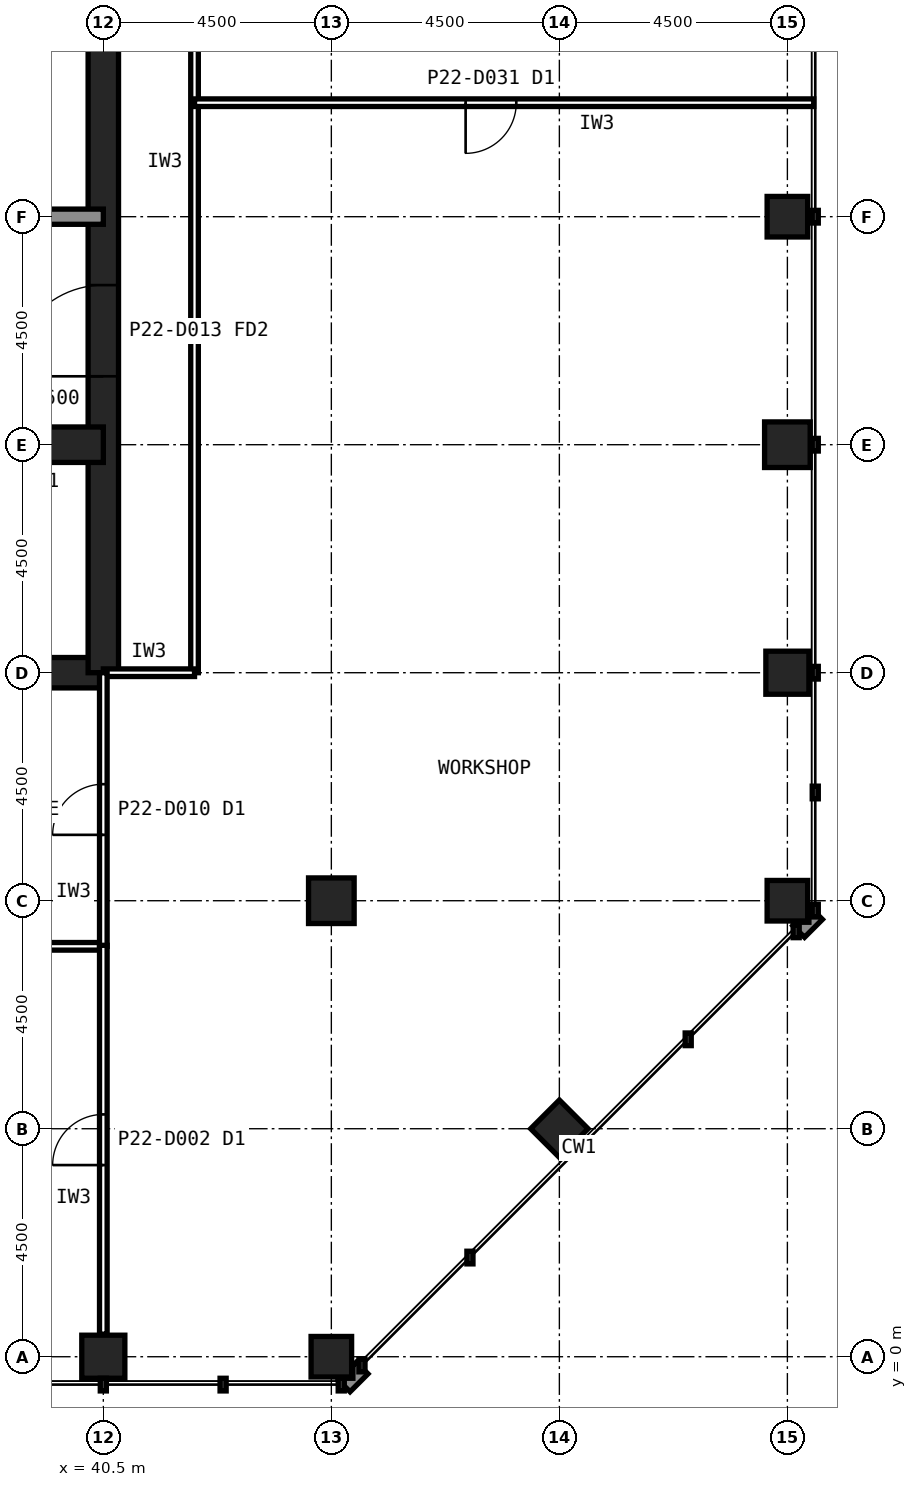
"""IFC4 building model, lengths in metres.
Left out: names, types, materials, properties, quantities, classifications, styles, units other than length and angle.
Written with IfcOpenShell. Run it as: python <this file> out.ifc"""

import sys

from ifc_helpers import new_model, si_unit, direction, frame, frame_2d, origin, origin_2d, place, context, subcontext, project, spatial, rectangle, hollow_rectangle, extrude, element, fill, save


model = new_model("IFC4")
c1 = context("Model", 3, precision=1e-05, world=origin(), true_north=direction((0.0, 1.0)))
c2 = subcontext(c1, "Body", "Model", "MODEL_VIEW")
j1 = project(units=[si_unit("LENGTHUNIT", "METRE"), si_unit("PLANEANGLEUNIT", "RADIAN")], contexts=[c1])
p1 = place(None, origin())
s1 = spatial("IfcSite", under=j1, at=p1, CompositionType="ELEMENT")
p2 = place(p1, origin())
s2 = spatial("IfcBuilding", under=s1, at=p2, CompositionType="ELEMENT")
p3 = place(p2, frame((0.0, 0.0, 96.2)))
s3 = spatial("IfcBuildingStorey", under=s2, at=p3, CompositionType="ELEMENT", Elevation=96.2)
p4 = place(p3, frame((40.5, 0.0, 0.0), z_axis=(0.0, 0.0, 1.0), x_axis=(1.0, 0.0, 0.0)))
e1 = element("IfcColumn", 1, at=p4, inside=s3, PredefinedType="COLUMN", context=c2, shape_type="SweptSolid", body=[
    extrude(hollow_rectangle(XDim=0.85, YDim=0.85, WallThickness=0.05, at=origin_2d()), origin(), (0.0, 0.0, 1.0), 4.2),
])
for number, where, z_axis, x_axis in (
    (2, (45.0, 0.0, 0.0), (0.0, 0.0, 1.0), (1.0, 0.0, 0.0)),
    (3, (54.0, 9.0, 0.0), (0.0, 0.0, 1.0), (1.0, 0.0, 0.0)),
):
    element("IfcColumn", number, at=place(p3, frame(where, z_axis=z_axis, x_axis=x_axis)), inside=s3, PredefinedType="COLUMN", context=c2, shape_type="SweptSolid", body=[
        extrude(hollow_rectangle(XDim=0.8, YDim=0.8, WallThickness=0.045, at=origin_2d()), origin(), (0.0, 0.0, 1.0), 4.2),
    ])
p5 = place(p3, frame((54.0, 13.5, 0.0), z_axis=(0.0, 0.0, 1.0), x_axis=(1.0, 0.0, 0.0)))
e4 = element("IfcColumn", 4, at=p5, inside=s3, PredefinedType="COLUMN", context=c2, shape_type="SweptSolid", body=[
    extrude(hollow_rectangle(XDim=0.85, YDim=0.85, WallThickness=0.05, at=origin_2d()), origin(), (0.0, 0.0, 1.0), 4.2),
])
p6 = place(p3, frame((54.0, 18.0, 0.0), z_axis=(0.0, 0.0, 1.0), x_axis=(1.0, 0.0, 0.0)))
e5 = element("IfcColumn", 5, at=p6, inside=s3, PredefinedType="COLUMN", context=c2, shape_type="SweptSolid", body=[
    extrude(hollow_rectangle(XDim=0.9, YDim=0.9, WallThickness=0.063, at=origin_2d()), origin(), (0.0, 0.0, 1.0), 4.2),
])
for number, where, z_axis, x_axis in (
    (6, (54.0, 22.5, 0.0), (0.0, 0.0, 1.0), (1.0, 0.0, 0.0)),
    (7, (49.5, 4.5, 0.0), (0.0, 0.0, 1.0), (0.707, 0.707, 0.0)),
):
    element("IfcColumn", number, at=place(p3, frame(where, z_axis=z_axis, x_axis=x_axis)), inside=s3, PredefinedType="COLUMN", context=c2, shape_type="SweptSolid", body=[
        extrude(hollow_rectangle(XDim=0.8, YDim=0.8, WallThickness=0.045, at=origin_2d()), origin(), (0.0, 0.0, 1.0), 4.2),
    ])
p7 = place(p3, frame((45.0, 9.0, 0.0), z_axis=(0.0, 0.0, 1.0), x_axis=(1.0, 0.0, 0.0)))
e8 = element("IfcColumn", 8, at=p7, inside=s3, PredefinedType="COLUMN", context=c2, shape_type="SweptSolid", body=[
    extrude(hollow_rectangle(XDim=0.9, YDim=0.9, WallThickness=0.063, at=origin_2d()), origin(), (0.0, 0.0, 1.0), 4.2),
])
p8 = place(p3, frame((13.5, 13.5, 0.0), z_axis=(0.0, 0.0, 1.0), x_axis=(1.0, 0.0, 0.0)))
e9 = element("IfcWall", 9, at=p8, inside=s3, PredefinedType="SHEAR", context=c2, shape_type="SweptSolid", body=[
    extrude(rectangle(XDim=27.0, YDim=0.6, at=frame_2d((13.5, 0.0))), origin(), (0.0, 0.0, 1.0), 4.2),
])
p9 = place(p3, frame((40.5, 13.5, 0.0), z_axis=(0.0, 0.0, 1.0), x_axis=(0.0, 1.0, 0.0)))
e10 = element("IfcWall", 10, at=p9, inside=s3, PredefinedType="SHEAR", context=c2, shape_type="SweptSolid", body=[
    extrude(rectangle(XDim=27.0, YDim=0.6, at=frame_2d((13.5, 0.0))), origin(), (0.0, 0.0, 1.0), 4.2),
])
p10 = place(p9, frame((5.85, 0.0, 0.0)))
e11 = element("IfcOpeningElement", 11, at=p10, cuts=e10, PredefinedType="OPENING", context=c2, shape_type="SweptSolid", body=[
    extrude(rectangle(XDim=1.8, YDim=2.1, at=frame_2d((0.9, 1.05))), frame((0.0, 0.31, 0.0), z_axis=(0.0, -1.0, 0.0), x_axis=(1.0, 0.0, 0.0)), (0.0, 0.0, 1.0), 0.62),
])
p11 = place(p9, frame((19.65, 0.0, 0.0)))
e12 = element("IfcOpeningElement", 12, at=p11, cuts=e10, PredefinedType="OPENING", context=c2, shape_type="SweptSolid", body=[
    extrude(rectangle(XDim=1.2, YDim=2.1, at=frame_2d((0.6, 1.05))), frame((0.0, 0.31, 0.0), z_axis=(0.0, -1.0, 0.0), x_axis=(1.0, 0.0, 0.0)), (0.0, 0.0, 1.0), 0.62),
])
p12 = place(p3, frame((13.5, 18.0, 0.0), z_axis=(0.0, 0.0, 1.0), x_axis=(1.0, 0.0, 0.0)))
e13 = element("IfcWall", 13, at=p12, inside=s3, PredefinedType="SHEAR", context=c2, shape_type="SweptSolid", body=[
    extrude(rectangle(XDim=27.0, YDim=0.7, at=frame_2d((13.5, 0.0))), origin(), (0.0, 0.0, 1.0), 4.2),
])
p13 = place(p12, frame((24.3, 0.0, 0.0)))
e14 = element("IfcOpeningElement", 14, at=p13, cuts=e13, PredefinedType="OPENING", context=c2, shape_type="SweptSolid", body=[
    extrude(rectangle(XDim=0.9, YDim=2.1, at=frame_2d((0.45, 1.05))), frame((0.0, 0.36, 0.0), z_axis=(0.0, -1.0, 0.0), x_axis=(1.0, 0.0, 0.0)), (0.0, 0.0, 1.0), 0.72),
])
p14 = place(p12, frame((5.45, 0.0, 0.0)))
e15 = element("IfcOpeningElement", 15, at=p14, cuts=e13, PredefinedType="OPENING", context=c2, shape_type="SweptSolid", body=[
    extrude(rectangle(XDim=1.1, YDim=2.1, at=frame_2d((0.55, 1.05))), frame((0.0, 0.36, 0.0), z_axis=(0.0, -1.0, 0.0), x_axis=(1.0, 0.0, 0.0)), (0.0, 0.0, 1.0), 0.72),
])
p15 = place(p12, frame((8.45, 0.0, 0.0)))
e16 = element("IfcOpeningElement", 16, at=p15, cuts=e13, PredefinedType="OPENING", context=c2, shape_type="SweptSolid", body=[
    extrude(rectangle(XDim=1.1, YDim=2.1, at=frame_2d((0.55, 1.05))), frame((0.0, 0.36, 0.0), z_axis=(0.0, -1.0, 0.0), x_axis=(1.0, 0.0, 0.0)), (0.0, 0.0, 1.0), 0.72),
])
p16 = place(p12, frame((11.45, 0.0, 0.0)))
e17 = element("IfcOpeningElement", 17, at=p16, cuts=e13, PredefinedType="OPENING", context=c2, shape_type="SweptSolid", body=[
    extrude(rectangle(XDim=1.1, YDim=2.1, at=frame_2d((0.55, 1.05))), frame((0.0, 0.36, 0.0), z_axis=(0.0, -1.0, 0.0), x_axis=(1.0, 0.0, 0.0)), (0.0, 0.0, 1.0), 0.72),
])
p17 = place(p12, frame((14.45, 0.0, 0.0)))
e18 = element("IfcOpeningElement", 18, at=p17, cuts=e13, PredefinedType="OPENING", context=c2, shape_type="SweptSolid", body=[
    extrude(rectangle(XDim=1.1, YDim=2.1, at=frame_2d((0.55, 1.05))), frame((0.0, 0.36, 0.0), z_axis=(0.0, -1.0, 0.0), x_axis=(1.0, 0.0, 0.0)), (0.0, 0.0, 1.0), 0.72),
])
p18 = place(p12, frame((17.45, 0.0, 0.0)))
e19 = element("IfcOpeningElement", 19, at=p18, cuts=e13, PredefinedType="OPENING", context=c2, shape_type="SweptSolid", body=[
    extrude(rectangle(XDim=1.1, YDim=2.1, at=frame_2d((0.55, 1.05))), frame((0.0, 0.36, 0.0), z_axis=(0.0, -1.0, 0.0), x_axis=(1.0, 0.0, 0.0)), (0.0, 0.0, 1.0), 0.72),
])
p19 = place(p12, frame((20.45, 0.0, 0.0)))
e20 = element("IfcOpeningElement", 20, at=p19, cuts=e13, PredefinedType="OPENING", context=c2, shape_type="SweptSolid", body=[
    extrude(rectangle(XDim=1.1, YDim=2.1, at=frame_2d((0.55, 1.05))), frame((0.0, 0.36, 0.0), z_axis=(0.0, -1.0, 0.0), x_axis=(1.0, 0.0, 0.0)), (0.0, 0.0, 1.0), 0.72),
])
p20 = place(p12, frame((1.6, 0.0, 0.0)))
e21 = element("IfcOpeningElement", 21, at=p20, cuts=e13, PredefinedType="OPENING", context=c2, shape_type="SweptSolid", body=[
    extrude(rectangle(XDim=1.3, YDim=2.2, at=frame_2d((0.65, 1.1))), frame((0.0, 0.36, 0.0), z_axis=(0.0, -1.0, 0.0), x_axis=(1.0, 0.0, 0.0)), (0.0, 0.0, 1.0), 0.72),
])
p21 = place(p3, frame((13.5, 22.5, 0.0), z_axis=(0.0, 0.0, 1.0), x_axis=(1.0, 0.0, 0.0)))
e22 = element("IfcWall", 22, at=p21, inside=s3, PredefinedType="SOLIDWALL", context=c2, shape_type="SweptSolid", body=[
    extrude(rectangle(XDim=27.0, YDim=0.3, at=frame_2d((13.5, 0.0))), origin(), (0.0, 0.0, 1.0), 4.04),
])
p22 = place(p21, frame((1.65, 0.0, 0.0)))
e23 = element("IfcOpeningElement", 23, at=p22, cuts=e22, PredefinedType="OPENING", context=c2, shape_type="SweptSolid", body=[
    extrude(rectangle(XDim=1.2, YDim=2.1, at=frame_2d((0.6, 1.05))), frame((0.0, 0.16, 0.0), z_axis=(0.0, -1.0, 0.0), x_axis=(1.0, 0.0, 0.0)), (0.0, 0.0, 1.0), 0.32),
])
p23 = place(p21, frame((6.025, 0.0, 0.0)))
e24 = element("IfcOpeningElement", 24, at=p23, cuts=e22, PredefinedType="OPENING", context=c2, shape_type="SweptSolid", body=[
    extrude(rectangle(XDim=1.0, YDim=2.1, at=frame_2d((0.5, 1.05))), frame((0.0, 0.16, 0.0), z_axis=(0.0, -1.0, 0.0), x_axis=(1.0, 0.0, 0.0)), (0.0, 0.0, 1.0), 0.32),
])
p24 = place(p21, frame((10.525, 0.0, 0.0)))
e25 = element("IfcOpeningElement", 25, at=p24, cuts=e22, PredefinedType="OPENING", context=c2, shape_type="SweptSolid", body=[
    extrude(rectangle(XDim=1.0, YDim=2.1, at=frame_2d((0.5, 1.05))), frame((0.0, 0.16, 0.0), z_axis=(0.0, -1.0, 0.0), x_axis=(1.0, 0.0, 0.0)), (0.0, 0.0, 1.0), 0.32),
])
p25 = place(p21, frame((19.75, 0.0, 0.0)))
e26 = element("IfcOpeningElement", 26, at=p25, cuts=e22, PredefinedType="OPENING", context=c2, shape_type="SweptSolid", body=[
    extrude(rectangle(XDim=1.0, YDim=2.1, at=frame_2d((0.5, 1.05))), frame((0.0, 0.16, 0.0), z_axis=(0.0, -1.0, 0.0), x_axis=(1.0, 0.0, 0.0)), (0.0, 0.0, 1.0), 0.32),
])
p26 = place(p21, frame((15.05, 0.0, 0.0)))
e27 = element("IfcOpeningElement", 27, at=p26, cuts=e22, PredefinedType="OPENING", context=c2, shape_type="SweptSolid", body=[
    extrude(rectangle(XDim=1.4, YDim=2.4, at=frame_2d((0.7, 1.2))), frame((0.0, 0.16, 0.0), z_axis=(0.0, -1.0, 0.0), x_axis=(1.0, 0.0, 0.0)), (0.0, 0.0, 1.0), 0.32),
])
p27 = place(p3, frame((42.3, 13.5, 0.0), z_axis=(0.0, 0.0, 1.0), x_axis=(0.0, 1.0, 0.0)))
e28 = element("IfcWall", 28, at=p27, inside=s3, PredefinedType="PARTITIONING", context=c2, shape_type="SweptSolid", body=[
    extrude(rectangle(XDim=28.8, YDim=0.15, at=frame_2d((14.4, 0.0))), origin(), (0.0, 0.0, 1.0), 4.04),
])
p28 = place(p27, frame((13.9, 0.0, 0.0)))
e29 = element("IfcOpeningElement", 29, at=p28, cuts=e28, PredefinedType="OPENING", context=c2, shape_type="SweptSolid", body=[
    extrude(rectangle(XDim=1.0, YDim=2.1, at=frame_2d((0.5, 1.05))), frame((0.0, 0.085, 0.0), z_axis=(0.0, -1.0, 0.0), x_axis=(1.0, 0.0, 0.0)), (0.0, 0.0, 1.0), 0.17),
])
p29 = place(p3, frame((40.5, 13.5, 0.0), z_axis=(0.0, 0.0, 1.0), x_axis=(1.0, 0.0, 0.0)))
e30 = element("IfcWall", 30, at=p29, inside=s3, PredefinedType="PARTITIONING", context=c2, shape_type="SweptSolid", body=[
    extrude(rectangle(XDim=1.8, YDim=0.15, at=frame_2d((0.9, 0.0))), origin(), (0.0, 0.0, 1.0), 3.189),
])
p30 = place(p3, frame((36.0, 8.1, 0.0), z_axis=(0.0, 0.0, 1.0), x_axis=(1.0, 0.0, 0.0)))
e31 = element("IfcWall", 31, at=p30, inside=s3, PredefinedType="PARTITIONING", context=c2, shape_type="SweptSolid", body=[
    extrude(rectangle(XDim=4.5, YDim=0.15, at=frame_2d((2.25, 0.0))), origin(), (0.0, 0.0, 1.0), 4.04),
])
p31 = place(p3, frame((40.5, 8.1, 0.0), z_axis=(0.0, 0.0, 1.0), x_axis=(0.0, 1.0, 0.0)))
e32 = element("IfcWall", 32, at=p31, inside=s3, PredefinedType="PARTITIONING", context=c2, shape_type="SweptSolid", body=[
    extrude(rectangle(XDim=5.4, YDim=0.15, at=frame_2d((2.7, 0.0))), origin(), (0.0, 0.0, 1.0), 3.189),
])
p32 = place(p31, frame((2.2, 0.0, 0.0)))
e33 = element("IfcOpeningElement", 33, at=p32, cuts=e32, PredefinedType="OPENING", context=c2, shape_type="SweptSolid", body=[
    extrude(rectangle(XDim=1.0, YDim=2.1, at=frame_2d((0.5, 1.05))), frame((0.0, 0.085, 0.0), z_axis=(0.0, -1.0, 0.0), x_axis=(1.0, 0.0, 0.0)), (0.0, 0.0, 1.0), 0.17),
])
p33 = place(p3, frame((54.52, 24.75, 0.0), z_axis=(0.0, 0.0, 1.0), x_axis=(-1.0, 0.0, 0.0)))
e34 = element("IfcWall", 34, at=p33, inside=s3, PredefinedType="PARTITIONING", context=c2, shape_type="SweptSolid", body=[
    extrude(rectangle(XDim=12.22, YDim=0.15, at=frame_2d((6.11, 0.0))), origin(), (0.0, 0.0, 1.0), 4.04),
])
p34 = place(p33, frame((5.87, 0.0, 0.0)))
e35 = element("IfcOpeningElement", 35, at=p34, cuts=e34, PredefinedType="OPENING", context=c2, shape_type="SweptSolid", body=[
    extrude(rectangle(XDim=1.0, YDim=2.1, at=frame_2d((0.5, 1.05))), frame((0.0, 0.085, 0.0), z_axis=(0.0, -1.0, 0.0), x_axis=(1.0, 0.0, 0.0)), (0.0, 0.0, 1.0), 0.17),
])
p35 = place(p3, frame((40.5, 0.445, 0.0), z_axis=(0.0, 0.0, 1.0), x_axis=(0.0, 1.0, 0.0)))
e36 = element("IfcWall", 36, at=p35, inside=s3, PredefinedType="PARTITIONING", context=c2, shape_type="SweptSolid", body=[
    extrude(rectangle(XDim=7.675, YDim=0.15, at=frame_2d((3.837, 0.0))), origin(), (0.0, 0.0, 1.0), 3.189),
])
p36 = place(p35, frame((3.337, 0.0, 0.0)))
e37 = element("IfcOpeningElement", 37, at=p36, cuts=e36, PredefinedType="OPENING", context=c2, shape_type="SweptSolid", body=[
    extrude(rectangle(XDim=1.0, YDim=2.1, at=frame_2d((0.5, 1.05))), frame((0.0, 0.085, 0.0), z_axis=(0.0, -1.0, 0.0), x_axis=(1.0, 0.0, 0.0)), (0.0, 0.0, 1.0), 0.17),
])
p37 = place(p10, origin())
e38 = element("IfcDoor", 38, at=p37, inside=s3, OperationType="SINGLE_SWING_LEFT", PredefinedType="DOOR", context=c2, shape_type="SweptSolid", body=[
    extrude(rectangle(XDim=1.8, YDim=2.1, at=frame_2d((0.9, 1.05))), frame((0.0, 0.025, 0.0), z_axis=(0.0, -1.0, 0.0), x_axis=(1.0, 0.0, 0.0)), (0.0, 0.0, 1.0), 0.05),
])
fill(e11, e38)
p38 = place(p32, origin())
e39 = element("IfcDoor", 39, at=p38, inside=s3, OperationType="SINGLE_SWING_LEFT", PredefinedType="DOOR", context=c2, shape_type="SweptSolid", body=[
    extrude(rectangle(XDim=1.0, YDim=2.1, at=frame_2d((0.5, 1.05))), frame((0.0, 0.025, 0.0), z_axis=(0.0, -1.0, 0.0), x_axis=(1.0, 0.0, 0.0)), (0.0, 0.0, 1.0), 0.05),
])
fill(e33, e39)
p39 = place(p34, origin())
e40 = element("IfcDoor", 40, at=p39, inside=s3, OperationType="SINGLE_SWING_RIGHT", PredefinedType="DOOR", context=c2, shape_type="SweptSolid", body=[
    extrude(rectangle(XDim=1.0, YDim=2.1, at=frame_2d((0.5, 1.05))), frame((0.0, 0.025, 0.0), z_axis=(0.0, -1.0, 0.0), x_axis=(1.0, 0.0, 0.0)), (0.0, 0.0, 1.0), 0.05),
])
fill(e35, e40)
p40 = place(p36, origin())
e41 = element("IfcDoor", 41, at=p40, inside=s3, OperationType="SINGLE_SWING_LEFT", PredefinedType="DOOR", context=c2, shape_type="SweptSolid", body=[
    extrude(rectangle(XDim=1.0, YDim=2.1, at=frame_2d((0.5, 1.05))), frame((0.0, 0.025, 0.0), z_axis=(0.0, -1.0, 0.0), x_axis=(1.0, 0.0, 0.0)), (0.0, 0.0, 1.0), 0.05),
])
fill(e37, e41)
save(model, sys.argv[1])
